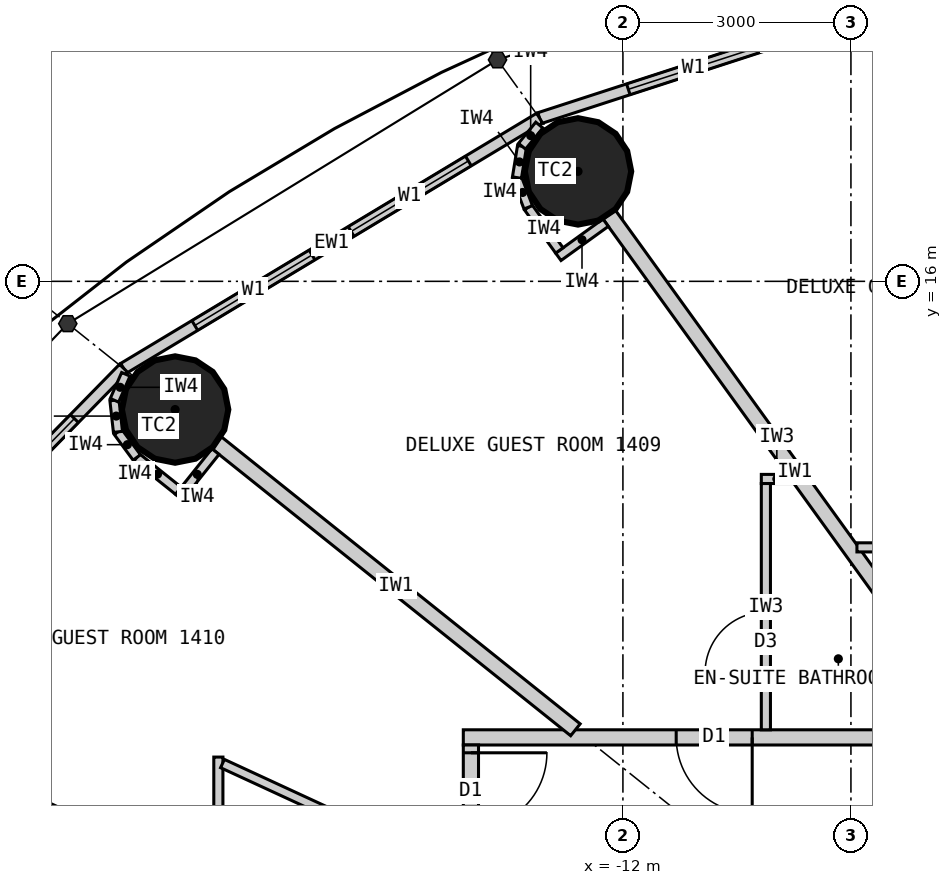
"""IFC4 building model, lengths in metres.
Left out: names, types, materials, properties, quantities, classifications, styles, units other than length and angle.
Written with IfcOpenShell. Run it as: python <this file> out.ifc"""

import sys

from ifc_helpers import new_model, si_unit, direction, frame, frame_2d, origin, origin_2d, place, context, subcontext, project, spatial, rectangle, circle, extrude, element, fill, save


model = new_model("IFC4")
c1 = context("Model", 3, precision=1e-05, world=origin(), true_north=direction((0.0, 1.0)))
c2 = subcontext(c1, "Body", "Model", "MODEL_VIEW")
j1 = project(units=[si_unit("LENGTHUNIT", "METRE"), si_unit("PLANEANGLEUNIT", "RADIAN")], contexts=[c1])
p1 = place(None, origin())
s1 = spatial("IfcSite", under=j1, at=p1, CompositionType="ELEMENT")
p2 = place(p1, origin())
s2 = spatial("IfcBuilding", under=s1, at=p2, CompositionType="ELEMENT")
p3 = place(p2, frame((0.0, 0.0, 60.6)))
s3 = spatial("IfcBuildingStorey", under=s2, at=p3, CompositionType="ELEMENT", Elevation=60.6)
for number, where, z_axis, x_axis in (
    (1, (-12.591, 17.447, 0.0), (0.0, 0.0, 1.0), (1.0, 0.0, 0.0)),
    (2, (-17.892, 14.313, 0.0), (0.0, 0.0, 1.0), (1.0, 0.0, 0.0)),
):
    element("IfcColumn", number, at=place(p3, frame(where, z_axis=z_axis, x_axis=x_axis)), inside=s3, PredefinedType="COLUMN", context=c2, shape_type="SweptSolid", body=[
        extrude(circle(Radius=0.7, at=origin_2d()), origin(), (0.0, 0.0, 1.0), 3.3),
    ])
p4 = place(p3, frame((-6.766, 20.202, 0.0), z_axis=(0.0, 0.0, 1.0), x_axis=(-0.951137534625, -0.308767534285, 0.0)))
e3 = element("IfcWall", 3, at=p4, inside=s3, PredefinedType="ELEMENTEDWALL", context=c2, shape_type="SweptSolid", body=[
    extrude(rectangle(XDim=6.655, YDim=0.15, at=frame_2d((3.328, 0.0))), origin(), (0.0, 0.0, 1.0), 3.12),
])
p5 = place(p4, frame((1.228, 0.0, 0.9)))
e4 = element("IfcOpeningElement", 4, at=p5, cuts=e3, PredefinedType="OPENING", context=c2, shape_type="SweptSolid", body=[
    extrude(rectangle(XDim=1.8, YDim=1.9, at=frame_2d((0.9, 0.95))), frame((0.0, 0.085, 0.0), z_axis=(0.0, -1.0, 0.0), x_axis=(1.0, 0.0, 0.0)), (0.0, 0.0, 1.0), 0.17),
])
p6 = place(p4, frame((3.628, 0.0, 0.9)))
e5 = element("IfcOpeningElement", 5, at=p6, cuts=e3, PredefinedType="OPENING", context=c2, shape_type="SweptSolid", body=[
    extrude(rectangle(XDim=1.8, YDim=1.9, at=frame_2d((0.9, 0.95))), frame((0.0, 0.085, 0.0), z_axis=(0.0, -1.0, 0.0), x_axis=(1.0, 0.0, 0.0)), (0.0, 0.0, 1.0), 0.17),
])
p7 = place(p3, frame((-13.096, 18.147, 0.0), z_axis=(0.0, 0.0, 1.0), x_axis=(-0.856983180864, -0.515344377787, 0.0)))
e6 = element("IfcWall", 6, at=p7, inside=s3, PredefinedType="ELEMENTEDWALL", context=c2, shape_type="SweptSolid", body=[
    extrude(rectangle(XDim=6.386, YDim=0.15, at=frame_2d((3.193, 0.0))), origin(), (0.0, 0.0, 1.0), 3.12),
])
p8 = place(p7, frame((1.093, 0.0, 0.9)))
e7 = element("IfcOpeningElement", 7, at=p8, cuts=e6, PredefinedType="OPENING", context=c2, shape_type="SweptSolid", body=[
    extrude(rectangle(XDim=1.8, YDim=1.9, at=frame_2d((0.9, 0.95))), frame((0.0, 0.085, 0.0), z_axis=(0.0, -1.0, 0.0), x_axis=(1.0, 0.0, 0.0)), (0.0, 0.0, 1.0), 0.17),
])
p9 = place(p7, frame((3.493, 0.0, 0.9)))
e8 = element("IfcOpeningElement", 8, at=p9, cuts=e6, PredefinedType="OPENING", context=c2, shape_type="SweptSolid", body=[
    extrude(rectangle(XDim=1.8, YDim=1.9, at=frame_2d((0.9, 0.95))), frame((0.0, 0.085, 0.0), z_axis=(0.0, -1.0, 0.0), x_axis=(1.0, 0.0, 0.0)), (0.0, 0.0, 1.0), 0.17),
])
p10 = place(p3, frame((-18.57, 14.856, 0.0), z_axis=(0.0, 0.0, 1.0), x_axis=(-0.699602905915, -0.714531856557, 0.0)))
e9 = element("IfcWall", 9, at=p10, inside=s3, PredefinedType="ELEMENTEDWALL", context=c2, shape_type="SweptSolid", body=[
    extrude(rectangle(XDim=6.051, YDim=0.15, at=frame_2d((3.025, 0.0))), origin(), (0.0, 0.0, 1.0), 3.12),
])
p11 = place(p10, frame((0.926, 0.0, 0.9)))
e10 = element("IfcOpeningElement", 10, at=p11, cuts=e9, PredefinedType="OPENING", context=c2, shape_type="SweptSolid", body=[
    extrude(rectangle(XDim=1.8, YDim=1.9, at=frame_2d((0.9, 0.95))), frame((0.0, 0.085, 0.0), z_axis=(0.0, -1.0, 0.0), x_axis=(1.0, 0.0, 0.0)), (0.0, 0.0, 1.0), 0.17),
])
p12 = place(p10, frame((3.325, 0.0, 0.9)))
e11 = element("IfcOpeningElement", 11, at=p12, cuts=e9, PredefinedType="OPENING", context=c2, shape_type="SweptSolid", body=[
    extrude(rectangle(XDim=1.8, YDim=1.9, at=frame_2d((0.9, 0.95))), frame((0.0, 0.085, 0.0), z_axis=(0.0, -1.0, 0.0), x_axis=(1.0, 0.0, 0.0)), (0.0, 0.0, 1.0), 0.17),
])
p13 = place(p3, frame((-14.1, 10.0, 0.0), z_axis=(0.0, 0.0, 1.0), x_axis=(1.0, 0.0, 0.0)))
e12 = element("IfcWall", 12, at=p13, inside=s3, PredefinedType="PARTITIONING", context=c2, shape_type="SweptSolid", body=[
    extrude(rectangle(XDim=28.2, YDim=0.2, at=frame_2d((14.1, 0.0))), origin(), (0.0, 0.0, 1.0), 3.12),
])
p14 = place(p13, frame((18.529, 0.0, 0.0)))
e13 = element("IfcOpeningElement", 13, at=p14, cuts=e12, PredefinedType="OPENING", context=c2, shape_type="SweptSolid", body=[
    extrude(rectangle(XDim=1.0, YDim=2.2, at=frame_2d((0.5, 1.1))), frame((0.0, 0.11, 0.0), z_axis=(0.0, -1.0, 0.0), x_axis=(1.0, 0.0, 0.0)), (0.0, 0.0, 1.0), 0.22),
])
p15 = place(p13, frame((14.623, 0.0, 0.0)))
e14 = element("IfcOpeningElement", 14, at=p15, cuts=e12, PredefinedType="OPENING", context=c2, shape_type="SweptSolid", body=[
    extrude(rectangle(XDim=1.0, YDim=2.2, at=frame_2d((0.5, 1.1))), frame((0.0, 0.11, 0.0), z_axis=(0.0, -1.0, 0.0), x_axis=(1.0, 0.0, 0.0)), (0.0, 0.0, 1.0), 0.22),
])
p16 = place(p13, frame((11.24, 0.0, 0.0)))
e15 = element("IfcOpeningElement", 15, at=p16, cuts=e12, PredefinedType="OPENING", context=c2, shape_type="SweptSolid", body=[
    extrude(rectangle(XDim=1.0, YDim=2.2, at=frame_2d((0.5, 1.1))), frame((0.0, 0.11, 0.0), z_axis=(0.0, -1.0, 0.0), x_axis=(1.0, 0.0, 0.0)), (0.0, 0.0, 1.0), 0.22),
])
p17 = place(p13, frame((8.671, 0.0, 0.0)))
e16 = element("IfcOpeningElement", 16, at=p17, cuts=e12, PredefinedType="OPENING", context=c2, shape_type="SweptSolid", body=[
    extrude(rectangle(XDim=1.0, YDim=2.2, at=frame_2d((0.5, 1.1))), frame((0.0, 0.11, 0.0), z_axis=(0.0, -1.0, 0.0), x_axis=(1.0, 0.0, 0.0)), (0.0, 0.0, 1.0), 0.22),
])
p18 = place(p13, frame((2.801, 0.0, 0.0)))
e17 = element("IfcOpeningElement", 17, at=p18, cuts=e12, PredefinedType="OPENING", context=c2, shape_type="SweptSolid", body=[
    extrude(rectangle(XDim=1.0, YDim=2.2, at=frame_2d((0.5, 1.1))), frame((0.0, 0.11, 0.0), z_axis=(0.0, -1.0, 0.0), x_axis=(1.0, 0.0, 0.0)), (0.0, 0.0, 1.0), 0.22),
])
p19 = place(p3, frame((-14.0, 9.9, 0.0), z_axis=(0.0, 0.0, 1.0), x_axis=(0.0, -1.0, 0.0)))
e18 = element("IfcWall", 18, at=p19, inside=s3, PredefinedType="PARTITIONING", context=c2, shape_type="SweptSolid", body=[
    extrude(rectangle(XDim=19.8, YDim=0.2, at=frame_2d((9.9, 0.0))), origin(), (0.0, 0.0, 1.0), 3.12),
])
p20 = place(p19, frame((0.103, 0.0, 0.0)))
e19 = element("IfcOpeningElement", 19, at=p20, cuts=e18, PredefinedType="OPENING", context=c2, shape_type="SweptSolid", body=[
    extrude(rectangle(XDim=1.0, YDim=2.2, at=frame_2d((0.5, 1.1))), frame((0.0, 0.11, 0.0), z_axis=(0.0, -1.0, 0.0), x_axis=(1.0, 0.0, 0.0)), (0.0, 0.0, 1.0), 0.22),
])
p21 = place(p19, frame((5.248, 0.0, 0.0)))
e20 = element("IfcOpeningElement", 20, at=p21, cuts=e18, PredefinedType="OPENING", context=c2, shape_type="SweptSolid", body=[
    extrude(rectangle(XDim=1.0, YDim=2.2, at=frame_2d((0.5, 1.1))), frame((0.0, 0.11, 0.0), z_axis=(0.0, -1.0, 0.0), x_axis=(1.0, 0.0, 0.0)), (0.0, 0.0, 1.0), 0.22),
])
p22 = place(p19, frame((9.438, 0.0, 0.0)))
e21 = element("IfcOpeningElement", 21, at=p22, cuts=e18, PredefinedType="OPENING", context=c2, shape_type="SweptSolid", body=[
    extrude(rectangle(XDim=1.0, YDim=2.2, at=frame_2d((0.5, 1.1))), frame((0.0, 0.11, 0.0), z_axis=(0.0, -1.0, 0.0), x_axis=(1.0, 0.0, 0.0)), (0.0, 0.0, 1.0), 0.22),
])
p23 = place(p19, frame((13.942, 0.0, 0.0)))
e22 = element("IfcOpeningElement", 22, at=p23, cuts=e18, PredefinedType="OPENING", context=c2, shape_type="SweptSolid", body=[
    extrude(rectangle(XDim=1.0, YDim=2.2, at=frame_2d((0.5, 1.1))), frame((0.0, 0.11, 0.0), z_axis=(0.0, -1.0, 0.0), x_axis=(1.0, 0.0, 0.0)), (0.0, 0.0, 1.0), 0.22),
])
p24 = place(p19, frame((18.698, 0.0, 0.0)))
e23 = element("IfcOpeningElement", 23, at=p24, cuts=e18, PredefinedType="OPENING", context=c2, shape_type="SweptSolid", body=[
    extrude(rectangle(XDim=1.0, YDim=2.2, at=frame_2d((0.5, 1.1))), frame((0.0, 0.11, 0.0), z_axis=(0.0, -1.0, 0.0), x_axis=(1.0, 0.0, 0.0)), (0.0, 0.0, 1.0), 0.22),
])
p25 = place(p3, frame((-7.289, 10.1, 0.0), z_axis=(0.0, 0.0, 1.0), x_axis=(-0.585198353053, 0.810890182197, 0.0)))
e24 = element("IfcWall", 24, at=p25, inside=s3, PredefinedType="PARTITIONING", context=c2, shape_type="SweptSolid", body=[
    extrude(rectangle(XDim=8.36, YDim=0.2, at=frame_2d((4.18, 0.0))), origin(), (0.0, 0.0, 1.0), 2.32),
])
p26 = place(p3, frame((-12.625, 10.1, 0.0), z_axis=(0.0, 0.0, 1.0), x_axis=(-0.780892451574, 0.624665493744, 0.0)))
e25 = element("IfcWall", 25, at=p26, inside=s3, PredefinedType="PARTITIONING", context=c2, shape_type="SweptSolid", body=[
    extrude(rectangle(XDim=6.045, YDim=0.2, at=frame_2d((3.022, 0.0))), origin(), (0.0, 0.0, 1.0), 2.32),
])
p27 = place(p3, frame((-14.1, 6.512, 0.0), z_axis=(0.0, 0.0, 1.0), x_axis=(-0.907832871056, 0.419332181247, 0.0)))
e26 = element("IfcWall", 26, at=p27, inside=s3, PredefinedType="PARTITIONING", context=c2, shape_type="SweptSolid", body=[
    extrude(rectangle(XDim=8.023, YDim=0.2, at=frame_2d((4.011, 0.0))), origin(), (0.0, 0.0, 1.0), 2.32),
])
p28 = place(p3, frame((-8.921, 12.5, 0.0), z_axis=(0.0, 0.0, 1.0), x_axis=(1.0, 0.0, 0.0)))
e27 = element("IfcWall", 27, at=p28, inside=s3, PredefinedType="PARTITIONING", context=c2, shape_type="SweptSolid", body=[
    extrude(rectangle(XDim=3.372, YDim=0.12, at=frame_2d((1.686, 0.0))), origin(), (0.0, 0.0, 1.0), 3.12),
])
p29 = place(p3, frame((-9.771, 13.4, 0.0), z_axis=(0.0, 0.0, 1.0), x_axis=(-1.0, 0.0, 0.0)))
e28 = element("IfcWall", 28, at=p29, inside=s3, PredefinedType="PARTITIONING", context=c2, shape_type="SweptSolid", body=[
    extrude(rectangle(XDim=0.408, YDim=0.12, at=frame_2d((0.204, 0.0))), origin(), (0.0, 0.0, 1.0), 3.12),
])
p30 = place(p3, frame((-10.119, 10.1, 0.0), z_axis=(0.0, 0.0, 1.0), x_axis=(0.0, 1.0, 0.0)))
e29 = element("IfcWall", 29, at=p30, inside=s3, PredefinedType="PARTITIONING", context=c2, shape_type="SweptSolid", body=[
    extrude(rectangle(XDim=3.24, YDim=0.12, at=frame_2d((1.62, 0.0))), origin(), (0.0, 0.0, 1.0), 3.12),
])
p31 = place(p30, frame((0.75, 0.0, 0.0)))
e30 = element("IfcOpeningElement", 30, at=p31, cuts=e29, PredefinedType="OPENING", context=c2, shape_type="SweptSolid", body=[
    extrude(rectangle(XDim=0.8, YDim=2.1, at=frame_2d((0.4, 1.05))), frame((0.0, 0.07, 0.0), z_axis=(0.0, -1.0, 0.0), x_axis=(1.0, 0.0, 0.0)), (0.0, 0.0, 1.0), 0.14),
])
p32 = place(p3, frame((-17.323, 8.101, 0.0), z_axis=(0.0, 0.0, 1.0), x_axis=(0.0, 1.0, 0.0)))
e31 = element("IfcWall", 31, at=p32, inside=s3, PredefinedType="PARTITIONING", context=c2, shape_type="SweptSolid", body=[
    extrude(rectangle(XDim=1.64, YDim=0.12, at=frame_2d((0.82, 0.0))), origin(), (0.0, 0.0, 1.0), 3.12),
])
p33 = place(p3, frame((-14.1, 8.193, 0.0), z_axis=(0.0, 0.0, 1.0), x_axis=(-0.907836493557, 0.419324338628, 0.0)))
e32 = element("IfcWall", 32, at=p33, inside=s3, PredefinedType="PARTITIONING", context=c2, shape_type="SweptSolid", body=[
    extrude(rectangle(XDim=3.49, YDim=0.12, at=frame_2d((1.745, 0.0))), origin(), (0.0, 0.0, 1.0), 3.12),
])
p34 = place(p33, frame((0.75, 0.0, 0.0)))
e33 = element("IfcOpeningElement", 33, at=p34, cuts=e32, PredefinedType="OPENING", context=c2, shape_type="SweptSolid", body=[
    extrude(rectangle(XDim=0.8, YDim=2.1, at=frame_2d((0.4, 1.05))), frame((0.0, 0.07, 0.0), z_axis=(0.0, -1.0, 0.0), x_axis=(1.0, 0.0, 0.0)), (0.0, 0.0, 1.0), 0.14),
])
p35 = place(p3, frame((-12.227, 16.772, 0.0), z_axis=(0.0, 0.0, 1.0), x_axis=(-0.810821798253, -0.585293098778, 0.0)))
e34 = element("IfcWall", 34, at=p35, inside=s3, PredefinedType="PARTITIONING", context=c2, shape_type="SweptSolid", body=[
    extrude(rectangle(XDim=0.768, YDim=0.12, at=frame_2d((0.384, 0.0))), origin(), (0.0, 0.0, 1.0), 3.12),
])
p36 = place(p3, frame((-12.836, 16.406, 0.0), z_axis=(0.0, 0.0, 1.0), x_axis=(-0.585223113993, 0.810872312296, 0.0)))
e35 = element("IfcWall", 35, at=p36, inside=s3, PredefinedType="PARTITIONING", context=c2, shape_type="SweptSolid", body=[
    extrude(rectangle(XDim=0.7, YDim=0.12, at=frame_2d((0.35, 0.0))), origin(), (0.0, 0.0, 1.0), 3.12),
])
p37 = place(p3, frame((-13.246, 16.974, 0.0), z_axis=(0.0, 0.0, 1.0), x_axis=(-0.355728122235, 0.934589483705, 0.0)))
e36 = element("IfcWall", 36, at=p37, inside=s3, PredefinedType="PARTITIONING", context=c2, shape_type="SweptSolid", body=[
    extrude(rectangle(XDim=0.418, YDim=0.12, at=frame_2d((0.209, 0.0))), origin(), (0.0, 0.0, 1.0), 3.12),
])
p38 = place(p3, frame((-13.394, 17.365, 0.0), z_axis=(0.0, 0.0, 1.0), x_axis=(0.159379276926, 0.987217425943, 0.0)))
e37 = element("IfcWall", 37, at=p38, inside=s3, PredefinedType="PARTITIONING", context=c2, shape_type="SweptSolid", body=[
    extrude(rectangle(XDim=0.418, YDim=0.12, at=frame_2d((0.209, 0.0))), origin(), (0.0, 0.0, 1.0), 3.12),
])
p39 = place(p3, frame((-13.328, 17.777, 0.0), z_axis=(0.0, 0.0, 1.0), x_axis=(0.632276783541, 0.774742582407, 0.0)))
e38 = element("IfcWall", 38, at=p39, inside=s3, PredefinedType="PARTITIONING", context=c2, shape_type="SweptSolid", body=[
    extrude(rectangle(XDim=0.36, YDim=0.12, at=frame_2d((0.18, 0.0))), origin(), (0.0, 0.0, 1.0), 3.12),
])
p40 = place(p3, frame((-17.361, 13.76, 0.0), z_axis=(0.0, 0.0, 1.0), x_axis=(-0.624501042889, -0.781023973659, 0.0)))
e39 = element("IfcWall", 39, at=p40, inside=s3, PredefinedType="PARTITIONING", context=c2, shape_type="SweptSolid", body=[
    extrude(rectangle(XDim=0.767, YDim=0.12, at=frame_2d((0.384, 0.0))), origin(), (0.0, 0.0, 1.0), 3.12),
])
p41 = place(p3, frame((-17.85, 13.246, 0.0), z_axis=(0.0, 0.0, 1.0), x_axis=(-0.780902834923, 0.62465251333, 0.0)))
e40 = element("IfcWall", 40, at=p41, inside=s3, PredefinedType="PARTITIONING", context=c2, shape_type="SweptSolid", body=[
    extrude(rectangle(XDim=0.7, YDim=0.12, at=frame_2d((0.35, 0.0))), origin(), (0.0, 0.0, 1.0), 3.12),
])
for number, where, z_axis, x_axis in (
    (41, (-18.396, 13.683, 0.0), (0.0, 0.0, 1.0), (-0.592, 0.806, 0.0)),
    (42, (-18.644, 14.02, 0.0), (0.0, 0.0, 1.0), (-0.11, 0.994, 0.0)),
):
    element("IfcWall", number, at=place(p3, frame(where, z_axis=z_axis, x_axis=x_axis)), inside=s3, PredefinedType="PARTITIONING", context=c2, shape_type="SweptSolid", body=[
        extrude(rectangle(XDim=0.418, YDim=0.12, at=frame_2d((0.209, 0.0))), origin(), (0.0, 0.0, 1.0), 3.12),
    ])
p42 = place(p3, frame((-18.69, 14.435, 0.0), z_axis=(0.0, 0.0, 1.0), x_axis=(0.401093412634, 0.91603715773, 0.0)))
e43 = element("IfcWall", 43, at=p42, inside=s3, PredefinedType="PARTITIONING", context=c2, shape_type="SweptSolid", body=[
    extrude(rectangle(XDim=0.373, YDim=0.12, at=frame_2d((0.187, 0.0))), origin(), (0.0, 0.0, 1.0), 3.12),
])
p43 = place(p6, origin())
e44 = element("IfcWindow", 44, at=p43, inside=s3, PartitioningType="SINGLE_PANEL", PredefinedType="WINDOW", context=c2, shape_type="SweptSolid", body=[
    extrude(rectangle(XDim=1.8, YDim=1.9, at=frame_2d((0.9, 0.95))), frame((0.0, 0.03, 0.0), z_axis=(0.0, -1.0, 0.0), x_axis=(1.0, 0.0, 0.0)), (0.0, 0.0, 1.0), 0.06),
])
fill(e5, e44)
p44 = place(p8, origin())
e45 = element("IfcWindow", 45, at=p44, inside=s3, PartitioningType="SINGLE_PANEL", PredefinedType="WINDOW", context=c2, shape_type="SweptSolid", body=[
    extrude(rectangle(XDim=1.8, YDim=1.9, at=frame_2d((0.9, 0.95))), frame((0.0, 0.03, 0.0), z_axis=(0.0, -1.0, 0.0), x_axis=(1.0, 0.0, 0.0)), (0.0, 0.0, 1.0), 0.06),
])
fill(e7, e45)
p45 = place(p9, origin())
e46 = element("IfcWindow", 46, at=p45, inside=s3, PartitioningType="SINGLE_PANEL", PredefinedType="WINDOW", context=c2, shape_type="SweptSolid", body=[
    extrude(rectangle(XDim=1.8, YDim=1.9, at=frame_2d((0.9, 0.95))), frame((0.0, 0.03, 0.0), z_axis=(0.0, -1.0, 0.0), x_axis=(1.0, 0.0, 0.0)), (0.0, 0.0, 1.0), 0.06),
])
fill(e8, e46)
p46 = place(p11, origin())
e47 = element("IfcWindow", 47, at=p46, inside=s3, PartitioningType="SINGLE_PANEL", PredefinedType="WINDOW", context=c2, shape_type="SweptSolid", body=[
    extrude(rectangle(XDim=1.8, YDim=1.9, at=frame_2d((0.9, 0.95))), frame((0.0, 0.03, 0.0), z_axis=(0.0, -1.0, 0.0), x_axis=(1.0, 0.0, 0.0)), (0.0, 0.0, 1.0), 0.06),
])
fill(e10, e47)
p47 = place(p31, origin())
e48 = element("IfcDoor", 48, at=p47, inside=s3, OperationType="SINGLE_SWING_LEFT", PredefinedType="DOOR", context=c2, shape_type="SweptSolid", body=[
    extrude(rectangle(XDim=0.8, YDim=2.1, at=frame_2d((0.4, 1.05))), frame((0.0, 0.025, 0.0), z_axis=(0.0, -1.0, 0.0), x_axis=(1.0, 0.0, 0.0)), (0.0, 0.0, 1.0), 0.05),
])
fill(e30, e48)
p48 = place(p18, origin())
e49 = element("IfcDoor", 49, at=p48, inside=s3, OperationType="SINGLE_SWING_RIGHT", PredefinedType="DOOR", context=c2, shape_type="SweptSolid", body=[
    extrude(rectangle(XDim=1.0, YDim=2.2, at=frame_2d((0.5, 1.1))), frame((0.0, 0.025, 0.0), z_axis=(0.0, -1.0, 0.0), x_axis=(1.0, 0.0, 0.0)), (0.0, 0.0, 1.0), 0.05),
])
fill(e17, e49)
p49 = place(p20, origin())
e50 = element("IfcDoor", 50, at=p49, inside=s3, OperationType="SINGLE_SWING_LEFT", PredefinedType="DOOR", context=c2, shape_type="SweptSolid", body=[
    extrude(rectangle(XDim=1.0, YDim=2.2, at=frame_2d((0.5, 1.1))), frame((0.0, 0.025, 0.0), z_axis=(0.0, -1.0, 0.0), x_axis=(1.0, 0.0, 0.0)), (0.0, 0.0, 1.0), 0.05),
])
fill(e19, e50)
save(model, sys.argv[1])
